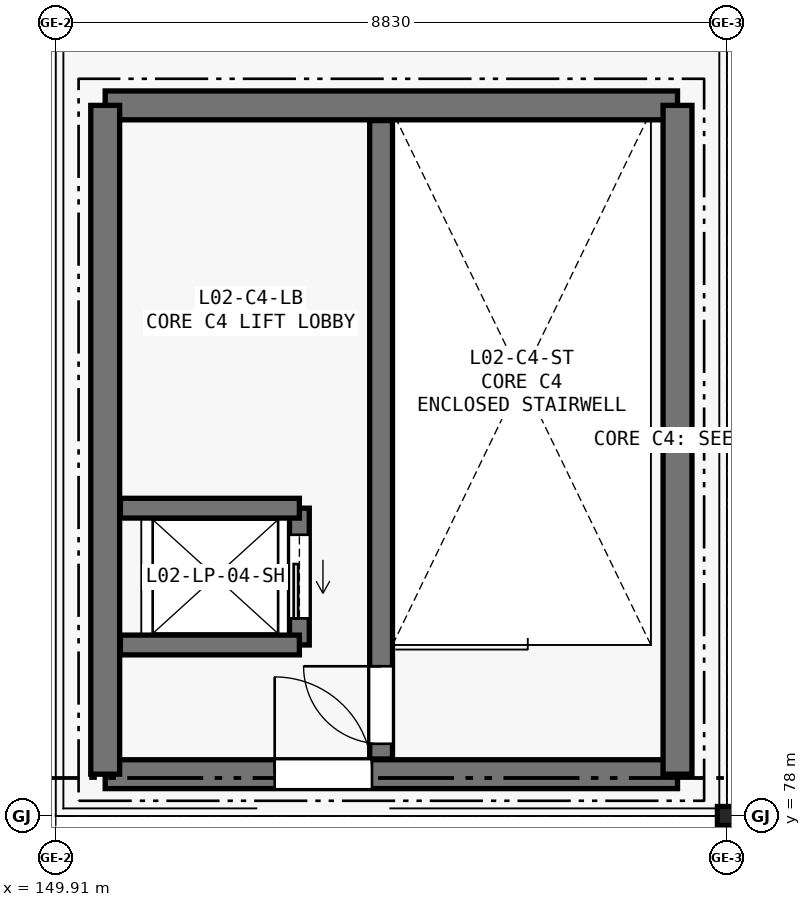
"""IFC4 building model, lengths in metres.
Left out: names, types, materials, properties, quantities, classifications, styles, units other than length and angle.
Written with IfcOpenShell. Run it as: python <this file> out.ifc"""

import sys

from ifc_helpers import new_model, si_unit, direction, frame, frame_2d, origin, origin_2d, place, context, subcontext, project, spatial, rectangle, i_section, extrude, element, fill, save


model = new_model("IFC4")
c1 = context("Model", 3, precision=1e-05, world=origin(), true_north=direction((0.0, 1.0)))
c2 = subcontext(c1, "Body", "Model", "MODEL_VIEW")
j1 = project(units=[si_unit("LENGTHUNIT", "METRE"), si_unit("PLANEANGLEUNIT", "RADIAN")], contexts=[c1])
p1 = place(None, origin())
s1 = spatial("IfcSite", under=j1, at=p1, CompositionType="ELEMENT")
p2 = place(p1, origin())
s2 = spatial("IfcBuilding", under=s1, at=p2, CompositionType="ELEMENT")
p3 = place(p2, frame((0.0, 0.0, 10.8)))
s3 = spatial("IfcBuildingStorey", under=s2, at=p3, CompositionType="ELEMENT", Elevation=10.8)
p4 = place(p3, frame((158.74, 78.0, 0.0), z_axis=(0.0, 0.0, 1.0), x_axis=(1.0, 0.0, 0.0)))
e1 = element("IfcColumn", 1, at=p4, inside=s3, PredefinedType="COLUMN", context=c2, shape_type="SweptSolid", body=[
    extrude(i_section(OverallWidth=0.25, OverallDepth=0.25, WebThickness=0.009, FlangeThickness=0.014, FilletRadius=0.016, at=origin_2d()), origin(), (0.0, 0.0, 1.0), 4.2),
])
p5 = place(p3, frame((150.56, 78.55, 0.0), z_axis=(0.0, 0.0, 1.0), x_axis=(1.0, 0.0, 0.0)))
e2 = element("IfcWall", 2, at=p5, inside=s3, PredefinedType="SHEAR", context=c2, shape_type="SweptSolid", body=[
    extrude(rectangle(XDim=7.53, YDim=0.38, at=frame_2d((3.765, 0.0))), origin(), (0.0, 0.0, 1.0), 4.2),
])
p6 = place(p5, frame((2.23, 0.0, 0.0)))
e3 = element("IfcOpeningElement", 3, at=p6, cuts=e2, PredefinedType="OPENING", context=c2, shape_type="SweptSolid", body=[
    extrude(rectangle(XDim=1.28, YDim=2.15, at=frame_2d((0.64, 1.075))), frame((0.0, 0.2, 0.0), z_axis=(0.0, -1.0, 0.0), x_axis=(1.0, 0.0, 0.0)), (0.0, 0.0, 1.0), 0.4),
])
p7 = place(p3, frame((158.09, 87.35, 0.0), z_axis=(0.0, 0.0, 1.0), x_axis=(-1.0, 0.0, 0.0)))
e4 = element("IfcWall", 4, at=p7, inside=s3, PredefinedType="SHEAR", context=c2, shape_type="SweptSolid", body=[
    extrude(rectangle(XDim=7.53, YDim=0.38, at=frame_2d((3.765, 0.0))), origin(), (0.0, 0.0, 1.0), 4.2),
])
for number, where, z_axis, x_axis in (
    (5, (150.56, 87.35, 0.0), (0.0, 0.0, 1.0), (0.0, -1.0, 0.0)),
    (6, (158.09, 78.55, 0.0), (0.0, 0.0, 1.0), (0.0, 1.0, 0.0)),
):
    element("IfcWall", number, at=place(p3, frame(where, z_axis=z_axis, x_axis=x_axis)), inside=s3, PredefinedType="SHEAR", context=c2, shape_type="SweptSolid", body=[
        extrude(rectangle(XDim=8.8, YDim=0.38, at=frame_2d((4.4, 0.0))), origin(), (0.0, 0.0, 1.0), 4.2),
    ])
p8 = place(p3, frame((154.19, 78.75, 0.0), z_axis=(0.0, 0.0, 1.0), x_axis=(0.0, 1.0, 0.0)))
e7 = element("IfcWall", 7, at=p8, inside=s3, PredefinedType="SHEAR", context=c2, shape_type="SweptSolid", body=[
    extrude(rectangle(XDim=8.4, YDim=0.3, at=frame_2d((4.2, 0.0))), origin(), (0.0, 0.0, 1.0), 4.2),
])
p9 = place(p8, frame((0.2, 0.0, 0.0)))
e8 = element("IfcOpeningElement", 8, at=p9, cuts=e7, PredefinedType="OPENING", context=c2, shape_type="SweptSolid", body=[
    extrude(rectangle(XDim=1.02, YDim=2.1, at=frame_2d((0.51, 1.05))), frame((0.0, 0.16, 0.0), z_axis=(0.0, -1.0, 0.0), x_axis=(1.0, 0.0, 0.0)), (0.0, 0.0, 1.0), 0.32),
])
p10 = place(p3, frame((153.115, 80.25, 0.0), z_axis=(0.0, 0.0, 1.0), x_axis=(0.0, 1.0, 0.0)))
e9 = element("IfcWall", 9, at=p10, inside=s3, PredefinedType="SHEAR", context=c2, shape_type="SweptSolid", body=[
    extrude(rectangle(XDim=1.8, YDim=0.26, at=frame_2d((0.9, 0.0))), origin(), (0.0, 0.0, 1.0), 4.2),
])
p11 = place(p10, frame((0.35, 0.0, 0.0)))
e10 = element("IfcOpeningElement", 10, at=p11, cuts=e9, PredefinedType="OPENING", context=c2, shape_type="SweptSolid", body=[
    extrude(rectangle(XDim=1.1, YDim=2.15, at=frame_2d((0.55, 1.075))), frame((0.0, 0.14, 0.0), z_axis=(0.0, -1.0, 0.0), x_axis=(1.0, 0.0, 0.0)), (0.0, 0.0, 1.0), 0.28),
])
for number, where, z_axis, x_axis in (
    (11, (150.76, 80.25, 0.0), (0.0, 0.0, 1.0), (1.0, 0.0, 0.0)),
    (12, (150.76, 82.05, 0.0), (0.0, 0.0, 1.0), (1.0, 0.0, 0.0)),
):
    element("IfcWall", number, at=place(p3, frame(where, z_axis=z_axis, x_axis=x_axis)), inside=s3, PredefinedType="SHEAR", context=c2, shape_type="SweptSolid", body=[
        extrude(rectangle(XDim=2.355, YDim=0.26, at=frame_2d((1.177, 0.0))), origin(), (0.0, 0.0, 1.0), 4.2),
    ])
p12 = place(p6, origin())
e13 = element("IfcDoor", 13, at=p12, inside=s3, OperationType="SINGLE_SWING_LEFT", PredefinedType="DOOR", context=c2, shape_type="SweptSolid", body=[
    extrude(rectangle(XDim=1.28, YDim=2.15, at=frame_2d((0.64, 1.075))), frame((0.0, 0.025, 0.0), z_axis=(0.0, -1.0, 0.0), x_axis=(1.0, 0.0, 0.0)), (0.0, 0.0, 1.0), 0.05),
])
fill(e3, e13)
p13 = place(p9, origin())
e14 = element("IfcDoor", 14, at=p13, inside=s3, OperationType="SINGLE_SWING_RIGHT", PredefinedType="DOOR", context=c2, shape_type="SweptSolid", body=[
    extrude(rectangle(XDim=1.02, YDim=2.1, at=frame_2d((0.51, 1.05))), frame((0.0, 0.025, 0.0), z_axis=(0.0, -1.0, 0.0), x_axis=(1.0, 0.0, 0.0)), (0.0, 0.0, 1.0), 0.05),
])
fill(e8, e14)
p14 = place(p11, origin())
e15 = element("IfcDoor", 15, at=p14, inside=s3, OperationType="SLIDING_TO_LEFT", PredefinedType="DOOR", context=c2, shape_type="SweptSolid", body=[
    extrude(rectangle(XDim=1.1, YDim=2.15, at=frame_2d((0.55, 1.075))), frame((0.0, 0.025, 0.0), z_axis=(0.0, -1.0, 0.0), x_axis=(1.0, 0.0, 0.0)), (0.0, 0.0, 1.0), 0.05),
])
fill(e10, e15)
save(model, sys.argv[1])
